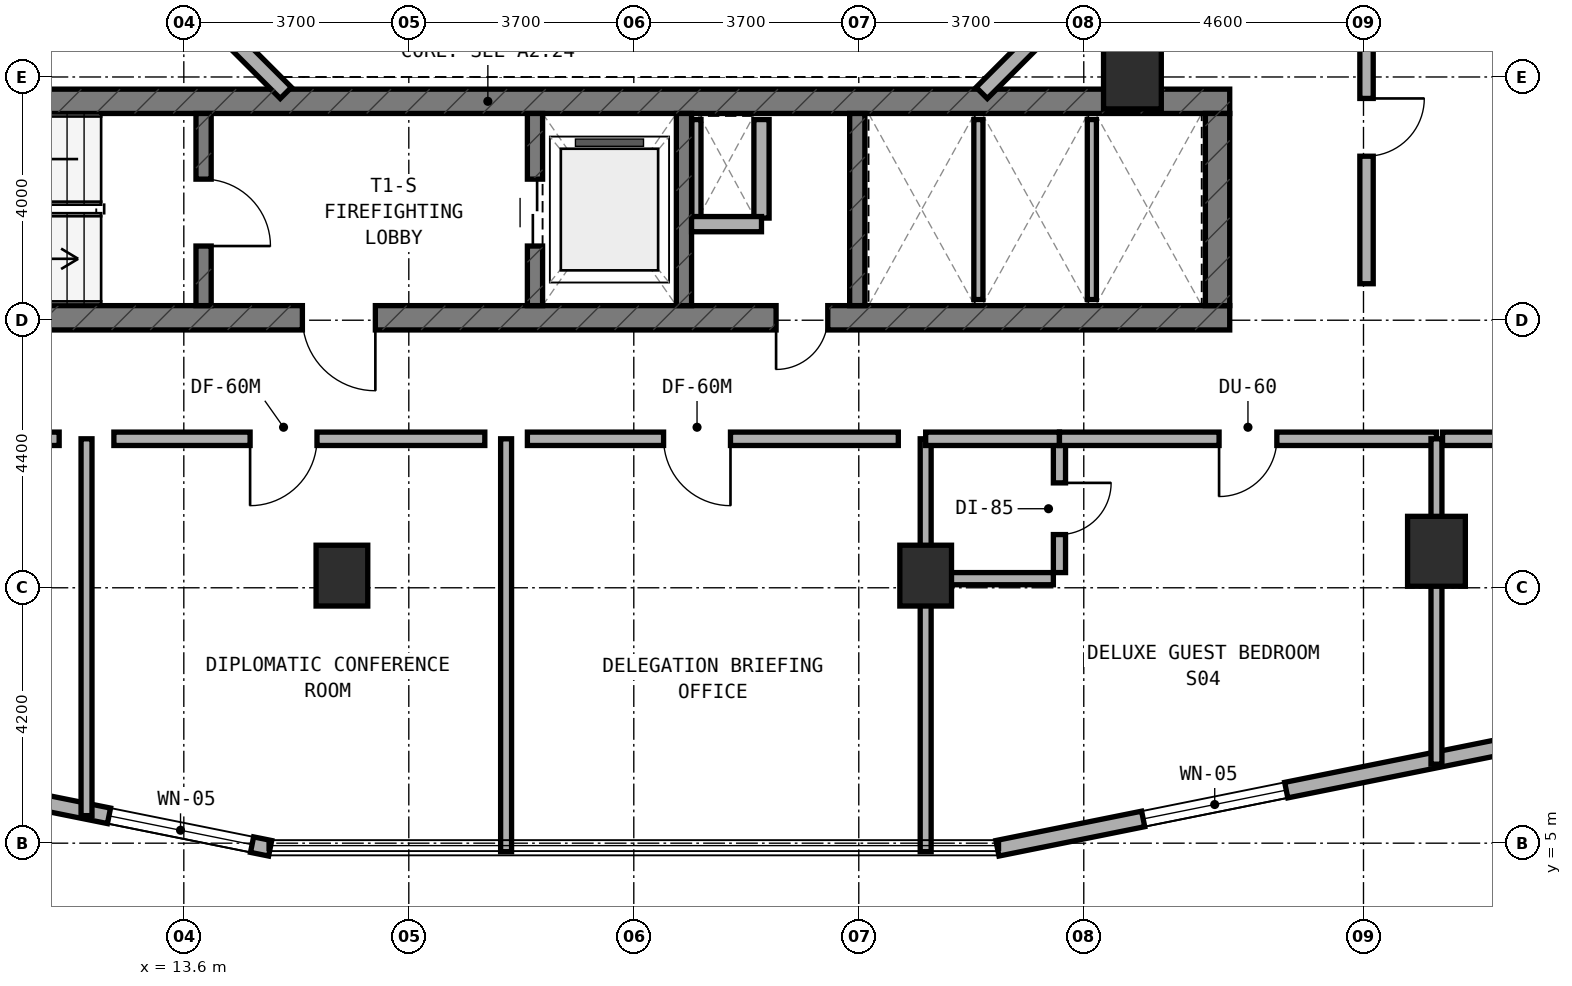
"""IFC4 building model, lengths in metres.
Left out: names, types, materials, properties, quantities, classifications, styles, units other than length and angle.
Written with IfcOpenShell. Run it as: python <this file> out.ifc"""

import sys

from ifc_helpers import new_model, si_unit, direction, frame, frame_2d, origin, origin_2d, place, context, subcontext, project, spatial, rectangle, extrude, element, fill, save


model = new_model("IFC4")
c1 = context("Model", 3, precision=1e-05, world=origin(), true_north=direction((0.0, 1.0)))
c2 = subcontext(c1, "Body", "Model", "MODEL_VIEW")
j1 = project(units=[si_unit("LENGTHUNIT", "METRE"), si_unit("PLANEANGLEUNIT", "RADIAN")], contexts=[c1])
p1 = place(None, origin())
s1 = spatial("IfcSite", under=j1, at=p1, CompositionType="ELEMENT")
p2 = place(p1, origin())
s2 = spatial("IfcBuilding", under=s1, at=p2, CompositionType="ELEMENT")
p3 = place(p2, frame((0.0, 0.0, 109.0)))
s3 = spatial("IfcBuildingStorey", under=s2, at=p3, CompositionType="ELEMENT", Elevation=109.0)
p4 = place(p3, frame((6.4, 13.64, 0.0), z_axis=(0.0, 0.0, 1.0), x_axis=(1.0, 0.0, 0.0)))
e1 = element("IfcWall", 1, at=p4, inside=s3, PredefinedType="SHEAR", context=c2, shape_type="SweptSolid", body=[
    extrude(rectangle(XDim=24.4, YDim=0.4, at=frame_2d((12.2, 0.0))), origin(), (0.0, 0.0, 1.0), 3.5),
])
p5 = place(p4, frame((9.15, 0.0, 0.0)))
e2 = element("IfcOpeningElement", 2, at=p5, cuts=e1, PredefinedType="OPENING", context=c2, shape_type="SweptSolid", body=[
    extrude(rectangle(XDim=1.2, YDim=2.15, at=frame_2d((0.6, 1.075))), frame((0.0, 0.21, 0.0), z_axis=(0.0, -1.0, 0.0), x_axis=(1.0, 0.0, 0.0)), (0.0, 0.0, 1.0), 0.42),
])
p6 = place(p4, frame((16.94, 0.0, 0.0)))
e3 = element("IfcOpeningElement", 3, at=p6, cuts=e1, PredefinedType="OPENING", context=c2, shape_type="SweptSolid", body=[
    extrude(rectangle(XDim=0.85, YDim=2.1, at=frame_2d((0.425, 1.05))), frame((0.0, 0.21, 0.0), z_axis=(0.0, -1.0, 0.0), x_axis=(1.0, 0.0, 0.0)), (0.0, 0.0, 1.0), 0.42),
])
p7 = place(p3, frame((6.4, 17.2, 0.0), z_axis=(0.0, 0.0, 1.0), x_axis=(1.0, 0.0, 0.0)))
e4 = element("IfcWall", 4, at=p7, inside=s3, PredefinedType="SHEAR", context=c2, shape_type="SweptSolid", body=[
    extrude(rectangle(XDim=24.4, YDim=0.4, at=frame_2d((12.2, 0.0))), origin(), (0.0, 0.0, 1.0), 3.5),
])
p8 = place(p3, frame((30.6, 13.84, 0.0), z_axis=(0.0, 0.0, 1.0), x_axis=(0.0, 1.0, 0.0)))
e5 = element("IfcWall", 5, at=p8, inside=s3, PredefinedType="SHEAR", context=c2, shape_type="SweptSolid", body=[
    extrude(rectangle(XDim=3.16, YDim=0.4, at=frame_2d((1.58, 0.0))), origin(), (0.0, 0.0, 1.0), 3.5),
])
p9 = place(p3, frame((13.925, 13.84, 0.0), z_axis=(0.0, 0.0, 1.0), x_axis=(0.0, 1.0, 0.0)))
e6 = element("IfcWall", 6, at=p9, inside=s3, PredefinedType="STANDARD", context=c2, shape_type="SweptSolid", body=[
    extrude(rectangle(XDim=3.16, YDim=0.25, at=frame_2d((1.58, 0.0))), origin(), (0.0, 0.0, 1.0), 3.22),
])
p10 = place(p9, frame((0.98, 0.0, 0.0)))
e7 = element("IfcOpeningElement", 7, at=p10, cuts=e6, PredefinedType="OPENING", context=c2, shape_type="SweptSolid", body=[
    extrude(rectangle(XDim=1.1, YDim=2.15, at=frame_2d((0.55, 1.075))), frame((0.0, 0.135, 0.0), z_axis=(0.0, -1.0, 0.0), x_axis=(1.0, 0.0, 0.0)), (0.0, 0.0, 1.0), 0.27),
])
p11 = place(p3, frame((19.375, 13.84, 0.0), z_axis=(0.0, 0.0, 1.0), x_axis=(0.0, 1.0, 0.0)))
e8 = element("IfcWall", 8, at=p11, inside=s3, PredefinedType="STANDARD", context=c2, shape_type="SweptSolid", body=[
    extrude(rectangle(XDim=3.16, YDim=0.25, at=frame_2d((1.58, 0.0))), origin(), (0.0, 0.0, 1.0), 3.22),
])
p12 = place(p11, frame((0.98, 0.0, 0.0)))
e9 = element("IfcOpeningElement", 9, at=p12, cuts=e8, PredefinedType="OPENING", context=c2, shape_type="SweptSolid", body=[
    extrude(rectangle(XDim=1.1, YDim=2.15, at=frame_2d((0.55, 1.075))), frame((0.0, 0.135, 0.0), z_axis=(0.0, -1.0, 0.0), x_axis=(1.0, 0.0, 0.0)), (0.0, 0.0, 1.0), 0.27),
])
for number, where, z_axis, x_axis in (
    (10, (21.825, 13.84, 0.0), (0.0, 0.0, 1.0), (0.0, 1.0, 0.0)),
    (11, (24.675, 13.84, 0.0), (0.0, 0.0, 1.0), (0.0, 1.0, 0.0)),
):
    element("IfcWall", number, at=place(p3, frame(where, z_axis=z_axis, x_axis=x_axis)), inside=s3, PredefinedType="STANDARD", context=c2, shape_type="SweptSolid", body=[
        extrude(rectangle(XDim=3.16, YDim=0.25, at=frame_2d((1.58, 0.0))), origin(), (0.0, 0.0, 1.0), 3.22),
    ])
for number, where, z_axis, x_axis in (
    (12, (16.2, 9.4, 0.0), (0.0, 0.0, 1.0), (1.0, 0.0, 0.0)),
    (13, (25.8, 9.4, 0.0), (0.0, 0.0, 1.0), (1.0, 0.0, 0.0)),
):
    element("IfcColumn", number, at=place(p3, frame(where, z_axis=z_axis, x_axis=x_axis)), inside=s3, PredefinedType="COLUMN", context=c2, shape_type="SweptSolid", body=[
        extrude(rectangle(XDim=0.85, YDim=1.0, at=origin_2d()), origin(), (0.0, 0.0, 1.0), 3.5),
    ])
for number, where, z_axis, x_axis in (
    (14, (34.2, 9.8, 0.0), (0.0, 0.0, 1.0), (1.0, 0.0, 0.0)),
    (15, (29.2, 17.65, 0.0), (0.0, 0.0, 1.0), (1.0, 0.0, 0.0)),
):
    element("IfcColumn", number, at=place(p3, frame(where, z_axis=z_axis, x_axis=x_axis)), inside=s3, PredefinedType="COLUMN", context=c2, shape_type="SweptSolid", body=[
        extrude(rectangle(XDim=0.95, YDim=1.15, at=origin_2d()), origin(), (0.0, 0.0, 1.0), 3.5),
    ])
p13 = place(p3, frame((6.018, 6.729, 0.0), z_axis=(0.0, 0.0, 1.0), x_axis=(0.980315963543, -0.197435082048, 0.0)))
e16 = element("IfcWall", 16, at=p13, inside=s3, PredefinedType="STANDARD", context=c2, shape_type="SweptSolid", body=[
    extrude(rectangle(XDim=9.183, YDim=0.26, at=frame_2d((4.591, 0.0))), origin(), (0.0, 0.0, 1.0), 3.22),
])
p14 = place(p13, frame((2.061, 0.0, 0.8)))
e17 = element("IfcOpeningElement", 17, at=p14, cuts=e16, PredefinedType="OPENING", context=c2, shape_type="SweptSolid", body=[
    extrude(rectangle(XDim=2.4, YDim=1.6, at=frame_2d((1.2, 0.8))), frame((0.0, 0.14, 0.0), z_axis=(0.0, -1.0, 0.0), x_axis=(1.0, 0.0, 0.0)), (0.0, 0.0, 1.0), 0.28),
])
p15 = place(p13, frame((6.479, 0.0, 0.8)))
e18 = element("IfcOpeningElement", 18, at=p15, cuts=e16, PredefinedType="OPENING", context=c2, shape_type="SweptSolid", body=[
    extrude(rectangle(XDim=2.4, YDim=1.6, at=frame_2d((1.2, 0.8))), frame((0.0, 0.14, 0.0), z_axis=(0.0, -1.0, 0.0), x_axis=(1.0, 0.0, 0.0)), (0.0, 0.0, 1.0), 0.28),
])
p16 = place(p3, frame((26.98, 4.916, 0.0), z_axis=(0.0, 0.0, 1.0), x_axis=(0.980315963543, 0.197435082048, 0.0)))
e19 = element("IfcWall", 19, at=p16, inside=s3, PredefinedType="STANDARD", context=c2, shape_type="SweptSolid", body=[
    extrude(rectangle(XDim=9.183, YDim=0.26, at=frame_2d((4.591, 0.0))), origin(), (0.0, 0.0, 1.0), 3.22),
])
p17 = place(p16, frame((2.445, 0.0, 0.8)))
e20 = element("IfcOpeningElement", 20, at=p17, cuts=e19, PredefinedType="OPENING", context=c2, shape_type="SweptSolid", body=[
    extrude(rectangle(XDim=2.4, YDim=1.6, at=frame_2d((1.2, 0.8))), frame((0.0, 0.14, 0.0), z_axis=(0.0, -1.0, 0.0), x_axis=(1.0, 0.0, 0.0)), (0.0, 0.0, 1.0), 0.28),
])
for number, where, z_axis, x_axis in (
    (21, (26.722, 17.338, 0.0), (0.0, 0.0, 1.0), (0.707, 0.707, 0.0)),
    (22, (13.444, 19.172, 0.0), (0.0, 0.0, 1.0), (0.707, -0.707, 0.0)),
):
    element("IfcWall", number, at=place(p3, frame(where, z_axis=z_axis, x_axis=x_axis)), inside=s3, PredefinedType="STANDARD", context=c2, shape_type="SweptSolid", body=[
        extrude(rectangle(XDim=2.594, YDim=0.26, at=frame_2d((1.297, 0.0))), origin(), (0.0, 0.0, 1.0), 3.22),
    ])
p18 = place(p3, frame((22.03, 15.28, 0.0), z_axis=(0.0, 0.0, 1.0), x_axis=(0.0, 1.0, 0.0)))
e23 = element("IfcWall", 23, at=p18, inside=s3, PredefinedType="PARTITIONING", context=c2, shape_type="SweptSolid", body=[
    extrude(rectangle(XDim=1.62, YDim=0.15, at=frame_2d((0.81, 0.0))), origin(), (0.0, 0.0, 1.0), 3.22),
])
p19 = place(p3, frame((23.1, 15.28, 0.0), z_axis=(0.0, 0.0, 1.0), x_axis=(0.0, 1.0, 0.0)))
e24 = element("IfcWall", 24, at=p19, inside=s3, PredefinedType="SOLIDWALL", context=c2, shape_type="SweptSolid", body=[
    extrude(rectangle(XDim=1.62, YDim=0.25, at=frame_2d((0.81, 0.0))), origin(), (0.0, 0.0, 1.0), 3.22),
])
p20 = place(p3, frame((21.95, 15.18, 0.0), z_axis=(0.0, 0.0, 1.0), x_axis=(1.0, 0.0, 0.0)))
e25 = element("IfcWall", 25, at=p20, inside=s3, PredefinedType="SOLIDWALL", context=c2, shape_type="SweptSolid", body=[
    extrude(rectangle(XDim=1.15, YDim=0.25, at=frame_2d((0.575, 0.0))), origin(), (0.0, 0.0, 1.0), 3.22),
])
p21 = place(p3, frame((26.667, 13.94, 0.0), z_axis=(0.0, 0.0, 1.0), x_axis=(0.0, 1.0, 0.0)))
e26 = element("IfcWall", 26, at=p21, inside=s3, PredefinedType="PARTITIONING", context=c2, shape_type="SweptSolid", body=[
    extrude(rectangle(XDim=2.96, YDim=0.15, at=frame_2d((1.48, 0.0))), origin(), (0.0, 0.0, 1.0), 3.22),
])
p22 = place(p3, frame((28.533, 13.94, 0.0), z_axis=(0.0, 0.0, 1.0), x_axis=(0.0, 1.0, 0.0)))
e27 = element("IfcWall", 27, at=p22, inside=s3, PredefinedType="PARTITIONING", context=c2, shape_type="SweptSolid", body=[
    extrude(rectangle(XDim=2.96, YDim=0.15, at=frame_2d((1.48, 0.0))), origin(), (0.0, 0.0, 1.0), 2.595),
])
p23 = place(p3, frame((6.83, 11.65, 0.0), z_axis=(0.0, 0.0, 1.0), x_axis=(1.0, 0.0, 0.0)))
e28 = element("IfcWall", 28, at=p23, inside=s3, PredefinedType="SOLIDWALL", context=c2, shape_type="SweptSolid", body=[
    extrude(rectangle(XDim=4.72, YDim=0.22, at=frame_2d((2.36, 0.0))), origin(), (0.0, 0.0, 1.0), 2.595),
])
p24 = place(p23, frame((1.619, 0.0, 0.0)))
e29 = element("IfcOpeningElement", 29, at=p24, cuts=e28, PredefinedType="OPENING", context=c2, shape_type="SweptSolid", body=[
    extrude(rectangle(XDim=1.1, YDim=2.1, at=frame_2d((0.55, 1.05))), frame((0.0, 0.12, 0.0), z_axis=(0.0, -1.0, 0.0), x_axis=(1.0, 0.0, 0.0)), (0.0, 0.0, 1.0), 0.24),
])
p25 = place(p3, frame((12.0, 5.453, 0.0), z_axis=(0.0, 0.0, 1.0), x_axis=(0.0, 1.0, 0.0)))
e30 = element("IfcWall", 30, at=p25, inside=s3, PredefinedType="SOLIDWALL", context=c2, shape_type="SweptSolid", body=[
    extrude(rectangle(XDim=6.197, YDim=0.18, at=frame_2d((3.099, 0.0))), origin(), (0.0, 0.0, 1.0), 2.835),
])
p26 = place(p3, frame((18.9, 4.86, 0.0), z_axis=(0.0, 0.0, 1.0), x_axis=(0.0, 1.0, 0.0)))
e31 = element("IfcWall", 31, at=p26, inside=s3, PredefinedType="SOLIDWALL", context=c2, shape_type="SweptSolid", body=[
    extrude(rectangle(XDim=6.79, YDim=0.18, at=frame_2d((3.395, 0.0))), origin(), (0.0, 0.0, 1.0), 2.835),
])
p27 = place(p3, frame((12.45, 11.65, 0.0), z_axis=(0.0, 0.0, 1.0), x_axis=(1.0, 0.0, 0.0)))
e32 = element("IfcWall", 32, at=p27, inside=s3, PredefinedType="SOLIDWALL", context=c2, shape_type="SweptSolid", body=[
    extrude(rectangle(XDim=6.1, YDim=0.22, at=frame_2d((3.05, 0.0))), origin(), (0.0, 0.0, 1.0), 2.595),
])
p28 = place(p27, frame((2.24, 0.0, 0.0)))
e33 = element("IfcOpeningElement", 33, at=p28, cuts=e32, PredefinedType="OPENING", context=c2, shape_type="SweptSolid", body=[
    extrude(rectangle(XDim=1.1, YDim=2.1, at=frame_2d((0.55, 1.05))), frame((0.0, 0.12, 0.0), z_axis=(0.0, -1.0, 0.0), x_axis=(1.0, 0.0, 0.0)), (0.0, 0.0, 1.0), 0.24),
])
p29 = place(p3, frame((19.25, 11.65, 0.0), z_axis=(0.0, 0.0, 1.0), x_axis=(1.0, 0.0, 0.0)))
e34 = element("IfcWall", 34, at=p29, inside=s3, PredefinedType="SOLIDWALL", context=c2, shape_type="SweptSolid", body=[
    extrude(rectangle(XDim=6.1, YDim=0.22, at=frame_2d((3.05, 0.0))), origin(), (0.0, 0.0, 1.0), 3.22),
])
p30 = place(p29, frame((2.24, 0.0, 0.0)))
e35 = element("IfcOpeningElement", 35, at=p30, cuts=e34, PredefinedType="OPENING", context=c2, shape_type="SweptSolid", body=[
    extrude(rectangle(XDim=1.1, YDim=2.1, at=frame_2d((0.55, 1.05))), frame((0.0, 0.12, 0.0), z_axis=(0.0, -1.0, 0.0), x_axis=(1.0, 0.0, 0.0)), (0.0, 0.0, 1.0), 0.24),
])
p31 = place(p3, frame((25.8, 4.86, 0.0), z_axis=(0.0, 0.0, 1.0), x_axis=(0.0, 1.0, 0.0)))
e36 = element("IfcWall", 36, at=p31, inside=s3, PredefinedType="SOLIDWALL", context=c2, shape_type="SweptSolid", body=[
    extrude(rectangle(XDim=6.79, YDim=0.18, at=frame_2d((3.395, 0.0))), origin(), (0.0, 0.0, 1.0), 2.595),
])
p32 = place(p3, frame((28.0, 9.45, 0.0), z_axis=(0.0, 0.0, 1.0), x_axis=(0.0, 1.0, 0.0)))
e37 = element("IfcWall", 37, at=p32, inside=s3, PredefinedType="PLUMBINGWALL", context=c2, shape_type="SweptSolid", body=[
    extrude(rectangle(XDim=2.1, YDim=0.2, at=frame_2d((1.05, 0.0))), origin(), (0.0, 0.0, 1.0), 2.835),
])
p33 = place(p32, frame((0.625, 0.0, 0.0)))
e38 = element("IfcOpeningElement", 38, at=p33, cuts=e37, PredefinedType="OPENING", context=c2, shape_type="SweptSolid", body=[
    extrude(rectangle(XDim=0.85, YDim=2.1, at=frame_2d((0.425, 1.05))), frame((0.0, 0.11, 0.0), z_axis=(0.0, -1.0, 0.0), x_axis=(1.0, 0.0, 0.0)), (0.0, 0.0, 1.0), 0.22),
])
p34 = place(p3, frame((25.9, 9.35, 0.0), z_axis=(0.0, 0.0, 1.0), x_axis=(1.0, 0.0, 0.0)))
e39 = element("IfcWall", 39, at=p34, inside=s3, PredefinedType="PLUMBINGWALL", context=c2, shape_type="SweptSolid", body=[
    extrude(rectangle(XDim=2.0, YDim=0.2, at=frame_2d((1.0, 0.0))), origin(), (0.0, 0.0, 1.0), 2.835),
])
p35 = place(p3, frame((25.8, 11.65, 0.0), z_axis=(0.0, 0.0, 1.0), x_axis=(1.0, 0.0, 0.0)))
e40 = element("IfcWall", 40, at=p35, inside=s3, PredefinedType="SOLIDWALL", context=c2, shape_type="SweptSolid", body=[
    extrude(rectangle(XDim=2.2, YDim=0.22, at=frame_2d((1.1, 0.0))), origin(), (0.0, 0.0, 1.0), 2.595),
])
p36 = place(p3, frame((28.0, 11.65, 0.0), z_axis=(0.0, 0.0, 1.0), x_axis=(1.0, 0.0, 0.0)))
e41 = element("IfcWall", 41, at=p36, inside=s3, PredefinedType="SOLIDWALL", context=c2, shape_type="SweptSolid", body=[
    extrude(rectangle(XDim=6.2, YDim=0.22, at=frame_2d((3.1, 0.0))), origin(), (0.0, 0.0, 1.0), 2.595),
])
p37 = place(p36, frame((2.625, 0.0, 0.0)))
e42 = element("IfcOpeningElement", 42, at=p37, cuts=e41, PredefinedType="OPENING", context=c2, shape_type="SweptSolid", body=[
    extrude(rectangle(XDim=0.95, YDim=2.1, at=frame_2d((0.475, 1.05))), frame((0.0, 0.12, 0.0), z_axis=(0.0, -1.0, 0.0), x_axis=(1.0, 0.0, 0.0)), (0.0, 0.0, 1.0), 0.24),
])
p38 = place(p3, frame((34.2, 6.299, 0.0), z_axis=(0.0, 0.0, 1.0), x_axis=(0.0, 1.0, 0.0)))
e43 = element("IfcWall", 43, at=p38, inside=s3, PredefinedType="SOLIDWALL", context=c2, shape_type="SweptSolid", body=[
    extrude(rectangle(XDim=5.351, YDim=0.18, at=frame_2d((2.675, 0.0))), origin(), (0.0, 0.0, 1.0), 2.595),
])
p39 = place(p3, frame((34.3, 11.65, 0.0), z_axis=(0.0, 0.0, 1.0), x_axis=(1.0, 0.0, 0.0)))
e44 = element("IfcWall", 44, at=p39, inside=s3, PredefinedType="SOLIDWALL", context=c2, shape_type="SweptSolid", body=[
    extrude(rectangle(XDim=6.64, YDim=0.22, at=frame_2d((3.32, 0.0))), origin(), (0.0, 0.0, 1.0), 2.835),
])
p40 = place(p39, frame((2.55, 0.0, 0.0)))
e45 = element("IfcOpeningElement", 45, at=p40, cuts=e44, PredefinedType="OPENING", context=c2, shape_type="SweptSolid", body=[
    extrude(rectangle(XDim=0.95, YDim=2.1, at=frame_2d((0.475, 1.05))), frame((0.0, 0.12, 0.0), z_axis=(0.0, -1.0, 0.0), x_axis=(1.0, 0.0, 0.0)), (0.0, 0.0, 1.0), 0.24),
])
p41 = place(p3, frame((33.05, 14.2, 0.0), z_axis=(0.0, 0.0, 1.0), x_axis=(0.0, 1.0, 0.0)))
e46 = element("IfcWall", 46, at=p41, inside=s3, PredefinedType="SOLIDWALL", context=c2, shape_type="SweptSolid", body=[
    extrude(rectangle(XDim=5.144, YDim=0.22, at=frame_2d((2.572, 0.0))), origin(), (0.0, 0.0, 1.0), 2.595),
])
p42 = place(p41, frame((2.097, 0.0, 0.0)))
e47 = element("IfcOpeningElement", 47, at=p42, cuts=e46, PredefinedType="OPENING", context=c2, shape_type="SweptSolid", body=[
    extrude(rectangle(XDim=0.95, YDim=2.1, at=frame_2d((0.475, 1.05))), frame((0.0, 0.12, 0.0), z_axis=(0.0, -1.0, 0.0), x_axis=(1.0, 0.0, 0.0)), (0.0, 0.0, 1.0), 0.24),
])
p43 = place(p15, origin())
e48 = element("IfcWindow", 48, at=p43, inside=s3, PartitioningType="SINGLE_PANEL", PredefinedType="WINDOW", context=c2, shape_type="SweptSolid", body=[
    extrude(rectangle(XDim=2.4, YDim=1.6, at=frame_2d((1.2, 0.8))), frame((0.0, 0.03, 0.0), z_axis=(0.0, -1.0, 0.0), x_axis=(1.0, 0.0, 0.0)), (0.0, 0.0, 1.0), 0.06),
])
fill(e18, e48)
p44 = place(p17, origin())
e49 = element("IfcWindow", 49, at=p44, inside=s3, PartitioningType="SINGLE_PANEL", PredefinedType="WINDOW", context=c2, shape_type="SweptSolid", body=[
    extrude(rectangle(XDim=2.4, YDim=1.6, at=frame_2d((1.2, 0.8))), frame((0.0, 0.03, 0.0), z_axis=(0.0, -1.0, 0.0), x_axis=(1.0, 0.0, 0.0)), (0.0, 0.0, 1.0), 0.06),
])
fill(e20, e49)
p45 = place(p10, frame((1.1, 0.0, 0.0), z_axis=(0.0, 0.0, 1.0), x_axis=(-1.0, 0.0, 0.0)))
e50 = element("IfcDoor", 50, at=p45, inside=s3, OperationType="SINGLE_SWING_RIGHT", PredefinedType="DOOR", context=c2, shape_type="SweptSolid", body=[
    extrude(rectangle(XDim=1.1, YDim=2.15, at=frame_2d((0.55, 1.075))), frame((0.0, 0.025, 0.0), z_axis=(0.0, -1.0, 0.0), x_axis=(1.0, 0.0, 0.0)), (0.0, 0.0, 1.0), 0.05),
])
fill(e7, e50)
p46 = place(p5, frame((1.2, 0.0, 0.0), z_axis=(0.0, 0.0, 1.0), x_axis=(-1.0, 0.0, 0.0)))
e51 = element("IfcDoor", 51, at=p46, inside=s3, OperationType="SINGLE_SWING_LEFT", PredefinedType="DOOR", context=c2, shape_type="SweptSolid", body=[
    extrude(rectangle(XDim=1.2, YDim=2.15, at=frame_2d((0.6, 1.075))), frame((0.0, 0.025, 0.0), z_axis=(0.0, -1.0, 0.0), x_axis=(1.0, 0.0, 0.0)), (0.0, 0.0, 1.0), 0.05),
])
fill(e2, e51)
p47 = place(p12, origin())
e52 = element("IfcDoor", 52, at=p47, inside=s3, OperationType="DOUBLE_DOOR_SLIDING", PredefinedType="DOOR", context=c2, shape_type="SweptSolid", body=[
    extrude(rectangle(XDim=1.1, YDim=2.15, at=frame_2d((0.55, 1.075))), frame((0.0, 0.025, 0.0), z_axis=(0.0, -1.0, 0.0), x_axis=(1.0, 0.0, 0.0)), (0.0, 0.0, 1.0), 0.05),
])
fill(e9, e52)
p48 = place(p6, frame((0.85, 0.0, 0.0), z_axis=(0.0, 0.0, 1.0), x_axis=(-1.0, 0.0, 0.0)))
e53 = element("IfcDoor", 53, at=p48, inside=s3, OperationType="SINGLE_SWING_RIGHT", PredefinedType="DOOR", context=c2, shape_type="SweptSolid", body=[
    extrude(rectangle(XDim=0.85, YDim=2.1, at=frame_2d((0.425, 1.05))), frame((0.0, 0.025, 0.0), z_axis=(0.0, -1.0, 0.0), x_axis=(1.0, 0.0, 0.0)), (0.0, 0.0, 1.0), 0.05),
])
fill(e3, e53)
p49 = place(p28, frame((1.1, 0.0, 0.0), z_axis=(0.0, 0.0, 1.0), x_axis=(-1.0, 0.0, 0.0)))
e54 = element("IfcDoor", 54, at=p49, inside=s3, OperationType="SINGLE_SWING_RIGHT", PredefinedType="DOOR", context=c2, shape_type="SweptSolid", body=[
    extrude(rectangle(XDim=1.1, YDim=2.1, at=frame_2d((0.55, 1.05))), frame((0.0, 0.025, 0.0), z_axis=(0.0, -1.0, 0.0), x_axis=(1.0, 0.0, 0.0)), (0.0, 0.0, 1.0), 0.05),
])
fill(e33, e54)
p50 = place(p30, frame((1.1, 0.0, 0.0), z_axis=(0.0, 0.0, 1.0), x_axis=(-1.0, 0.0, 0.0)))
e55 = element("IfcDoor", 55, at=p50, inside=s3, OperationType="SINGLE_SWING_LEFT", PredefinedType="DOOR", context=c2, shape_type="SweptSolid", body=[
    extrude(rectangle(XDim=1.1, YDim=2.1, at=frame_2d((0.55, 1.05))), frame((0.0, 0.025, 0.0), z_axis=(0.0, -1.0, 0.0), x_axis=(1.0, 0.0, 0.0)), (0.0, 0.0, 1.0), 0.05),
])
fill(e35, e55)
p51 = place(p33, frame((0.85, 0.0, 0.0), z_axis=(0.0, 0.0, 1.0), x_axis=(-1.0, 0.0, 0.0)))
e56 = element("IfcDoor", 56, at=p51, inside=s3, OperationType="SINGLE_SWING_LEFT", PredefinedType="DOOR", context=c2, shape_type="SweptSolid", body=[
    extrude(rectangle(XDim=0.85, YDim=2.1, at=frame_2d((0.425, 1.05))), frame((0.0, 0.025, 0.0), z_axis=(0.0, -1.0, 0.0), x_axis=(1.0, 0.0, 0.0)), (0.0, 0.0, 1.0), 0.05),
])
fill(e38, e56)
p52 = place(p37, frame((0.95, 0.0, 0.0), z_axis=(0.0, 0.0, 1.0), x_axis=(-1.0, 0.0, 0.0)))
e57 = element("IfcDoor", 57, at=p52, inside=s3, OperationType="SINGLE_SWING_RIGHT", PredefinedType="DOOR", context=c2, shape_type="SweptSolid", body=[
    extrude(rectangle(XDim=0.95, YDim=2.1, at=frame_2d((0.475, 1.05))), frame((0.0, 0.025, 0.0), z_axis=(0.0, -1.0, 0.0), x_axis=(1.0, 0.0, 0.0)), (0.0, 0.0, 1.0), 0.05),
])
fill(e42, e57)
p53 = place(p42, frame((0.95, 0.0, 0.0), z_axis=(0.0, 0.0, 1.0), x_axis=(-1.0, 0.0, 0.0)))
e58 = element("IfcDoor", 58, at=p53, inside=s3, OperationType="SINGLE_SWING_LEFT", PredefinedType="DOOR", context=c2, shape_type="SweptSolid", body=[
    extrude(rectangle(XDim=0.95, YDim=2.1, at=frame_2d((0.475, 1.05))), frame((0.0, 0.025, 0.0), z_axis=(0.0, -1.0, 0.0), x_axis=(1.0, 0.0, 0.0)), (0.0, 0.0, 1.0), 0.05),
])
fill(e47, e58)
save(model, sys.argv[1])
